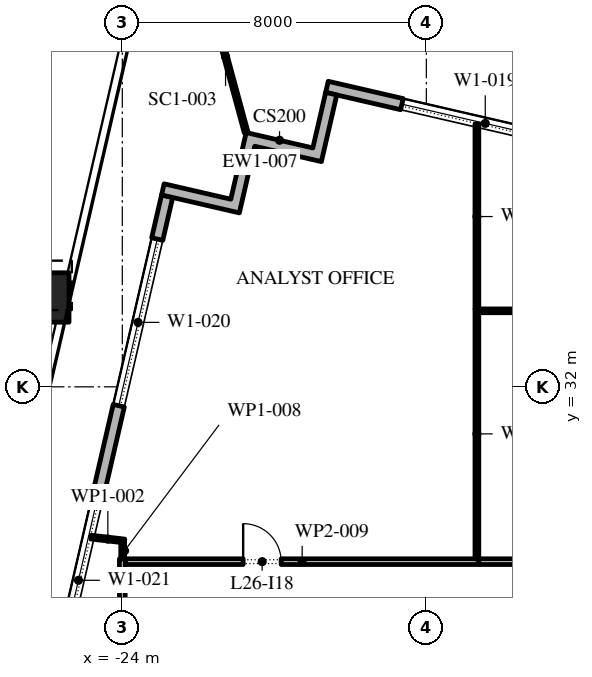
"""IFC4 building model, lengths in metres.
Left out: names, types, materials, properties, quantities, classifications, styles, units other than length and angle.
Written with IfcOpenShell. Run it as: python <this file> out.ifc"""

import sys

from ifc_helpers import new_model, si_unit, direction, frame, frame_2d, origin, origin_2d, place, context, subcontext, project, spatial, polyline, rectangle, outline, extrude, element, fill, save


model = new_model("IFC4")
c1 = context("Model", 3, precision=1e-05, world=origin(), true_north=direction((0.0, 1.0)))
c2 = subcontext(c1, "Body", "Model", "MODEL_VIEW")
j1 = project(units=[si_unit("LENGTHUNIT", "METRE"), si_unit("PLANEANGLEUNIT", "RADIAN")], contexts=[c1])
p1 = place(None, origin())
s1 = spatial("IfcSite", under=j1, at=p1, CompositionType="ELEMENT")
p2 = place(p1, origin())
s2 = spatial("IfcBuilding", under=s1, at=p2, CompositionType="ELEMENT")
p3 = place(p2, frame((0.0, 0.0, 122.4)))
s3 = spatial("IfcBuildingStorey", under=s2, at=p3, CompositionType="ELEMENT", Elevation=122.4)
p4 = place(p3, frame((-26.052, 34.351, 0.0), z_axis=(0.017443081717, 0.075683271502, 0.996979328429), x_axis=(-0.974454034257, 0.224587032398, 0.0)))
e1 = element("IfcColumn", 1, at=p4, inside=s3, PredefinedType="COLUMN", context=c2, shape_type="SweptSolid", body=[
    extrude(rectangle(XDim=1.3, YDim=1.3, at=origin_2d()), origin(), (0.0, 0.0, 1.0), 4.213),
])
p5 = place(p3, frame((31.078, 28.421, 0.0), z_axis=(0.0, 0.0, 1.0), x_axis=(-0.974370456532, 0.224949357493, 0.0)))
e2 = element("IfcWall", 2, at=p5, inside=s3, PredefinedType="STANDARD", context=c2, shape_type="SweptSolid", body=[
    extrude(rectangle(XDim=51.0, YDim=0.3, at=frame_2d((25.5, 0.0))), origin(), (0.0, 0.0, 1.0), 4.0),
])
p6 = place(p5, frame((1.875, 0.0, 0.45)))
e3 = element("IfcOpeningElement", 3, at=p6, cuts=e2, PredefinedType="OPENING", context=c2, shape_type="SweptSolid", body=[
    extrude(rectangle(XDim=4.5, YDim=2.95, at=frame_2d((2.25, 1.475))), frame((0.0, 0.16, 0.0), z_axis=(0.0, -1.0, 0.0), x_axis=(1.0, 0.0, 0.0)), (0.0, 0.0, 1.0), 0.32),
])
p7 = place(p5, frame((10.275, 0.0, 0.45)))
e4 = element("IfcOpeningElement", 4, at=p7, cuts=e2, PredefinedType="OPENING", context=c2, shape_type="SweptSolid", body=[
    extrude(rectangle(XDim=4.5, YDim=2.875, at=frame_2d((2.25, 1.438))), frame((0.0, 0.16, 0.0), z_axis=(0.0, -1.0, 0.0), x_axis=(1.0, 0.0, 0.0)), (0.0, 0.0, 1.0), 0.32),
])
p8 = place(p5, frame((18.825, 0.0, 0.45)))
e5 = element("IfcOpeningElement", 5, at=p8, cuts=e2, PredefinedType="OPENING", context=c2, shape_type="SweptSolid", body=[
    extrude(rectangle(XDim=4.5, YDim=2.825, at=frame_2d((2.25, 1.413))), frame((0.0, 0.16, 0.0), z_axis=(0.0, -1.0, 0.0), x_axis=(1.0, 0.0, 0.0)), (0.0, 0.0, 1.0), 0.32),
])
p9 = place(p5, frame((27.075, 0.0, 0.0)))
e6 = element("IfcOpeningElement", 6, at=p9, cuts=e2, PredefinedType="OPENING", context=c2, shape_type="SweptSolid", body=[
    extrude(rectangle(XDim=2.4, YDim=3.125, at=frame_2d((1.2, 1.562))), frame((0.0, 0.16, 0.0), z_axis=(0.0, -1.0, 0.0), x_axis=(1.0, 0.0, 0.0)), (0.0, 0.0, 1.0), 0.32),
])
p10 = place(p5, frame((35.925, 0.0, 0.45)))
e7 = element("IfcOpeningElement", 7, at=p10, cuts=e2, PredefinedType="OPENING", context=c2, shape_type="SweptSolid", body=[
    extrude(rectangle(XDim=4.5, YDim=2.575, at=frame_2d((2.25, 1.288))), frame((0.0, 0.16, 0.0), z_axis=(0.0, -1.0, 0.0), x_axis=(1.0, 0.0, 0.0)), (0.0, 0.0, 1.0), 0.32),
])
p11 = place(p5, frame((44.475, 0.0, 0.45)))
e8 = element("IfcOpeningElement", 8, at=p11, cuts=e2, PredefinedType="OPENING", context=c2, shape_type="SweptSolid", body=[
    extrude(rectangle(XDim=4.5, YDim=3.05, at=frame_2d((2.25, 1.525))), frame((0.0, 0.16, 0.0), z_axis=(0.0, -1.0, 0.0), x_axis=(1.0, 0.0, 0.0)), (0.0, 0.0, 1.0), 0.32),
])
p12 = place(p3, frame((-22.82, 37.016, 0.0), z_axis=(0.0, 0.0, 1.0), x_axis=(-0.224953880882, -0.974369412223, 0.0)))
e9 = element("IfcWall", 9, at=p12, inside=s3, PredefinedType="STANDARD", context=c2, shape_type="SweptSolid", body=[
    extrude(rectangle(XDim=49.5, YDim=0.3, at=frame_2d((24.75, 0.0))), origin(), (0.0, 0.0, 1.0), 4.0),
])
p13 = place(p12, frame((1.157, 0.0, 0.45)))
e10 = element("IfcOpeningElement", 10, at=p13, cuts=e9, PredefinedType="OPENING", context=c2, shape_type="SweptSolid", body=[
    extrude(rectangle(XDim=4.5, YDim=3.05, at=frame_2d((2.25, 1.525))), frame((0.0, 0.16, 0.0), z_axis=(0.0, -1.0, 0.0), x_axis=(1.0, 0.0, 0.0)), (0.0, 0.0, 1.0), 0.32),
])
p14 = place(p12, frame((8.121, 0.0, 0.45)))
e11 = element("IfcOpeningElement", 11, at=p14, cuts=e9, PredefinedType="OPENING", context=c2, shape_type="SweptSolid", body=[
    extrude(rectangle(XDim=4.5, YDim=3.05, at=frame_2d((2.25, 1.525))), frame((0.0, 0.16, 0.0), z_axis=(0.0, -1.0, 0.0), x_axis=(1.0, 0.0, 0.0)), (0.0, 0.0, 1.0), 0.32),
])
p15 = place(p12, frame((15.236, 0.0, 0.45)))
e12 = element("IfcOpeningElement", 12, at=p15, cuts=e9, PredefinedType="OPENING", context=c2, shape_type="SweptSolid", body=[
    extrude(rectangle(XDim=4.5, YDim=3.05, at=frame_2d((2.25, 1.525))), frame((0.0, 0.16, 0.0), z_axis=(0.0, -1.0, 0.0), x_axis=(1.0, 0.0, 0.0)), (0.0, 0.0, 1.0), 0.32),
])
p16 = place(p12, frame((23.4, 0.0, 0.0)))
e13 = element("IfcOpeningElement", 13, at=p16, cuts=e9, PredefinedType="OPENING", context=c2, shape_type="SweptSolid", body=[
    extrude(rectangle(XDim=2.4, YDim=3.5, at=frame_2d((1.2, 1.75))), frame((0.0, 0.16, 0.0), z_axis=(0.0, -1.0, 0.0), x_axis=(1.0, 0.0, 0.0)), (0.0, 0.0, 1.0), 0.32),
])
p17 = place(p12, frame((29.464, 0.0, 0.45)))
e14 = element("IfcOpeningElement", 14, at=p17, cuts=e9, PredefinedType="OPENING", context=c2, shape_type="SweptSolid", body=[
    extrude(rectangle(XDim=4.5, YDim=2.875, at=frame_2d((2.25, 1.438))), frame((0.0, 0.16, 0.0), z_axis=(0.0, -1.0, 0.0), x_axis=(1.0, 0.0, 0.0)), (0.0, 0.0, 1.0), 0.32),
])
p18 = place(p12, frame((36.579, 0.0, 0.45)))
e15 = element("IfcOpeningElement", 15, at=p18, cuts=e9, PredefinedType="OPENING", context=c2, shape_type="SweptSolid", body=[
    extrude(rectangle(XDim=4.5, YDim=2.675, at=frame_2d((2.25, 1.337))), frame((0.0, 0.16, 0.0), z_axis=(0.0, -1.0, 0.0), x_axis=(1.0, 0.0, 0.0)), (0.0, 0.0, 1.0), 0.32),
])
p19 = place(p12, frame((43.693, 0.0, 0.45)))
e16 = element("IfcOpeningElement", 16, at=p19, cuts=e9, PredefinedType="OPENING", context=c2, shape_type="SweptSolid", body=[
    extrude(rectangle(XDim=4.5, YDim=3.05, at=frame_2d((2.25, 1.525))), frame((0.0, 0.16, 0.0), z_axis=(0.0, -1.0, 0.0), x_axis=(1.0, 0.0, 0.0)), (0.0, 0.0, 1.0), 0.32),
])
p20 = place(p3, origin())
e17 = element("IfcWall", 17, at=p20, inside=s3, PredefinedType="STANDARD", context=c2, shape_type="SweptSolid", body=[
    extrude(outline(polyline([(-22.967, 37.049), (-22.899, 37.342), (-21.145, 36.937), (-20.74, 38.691), (-18.986, 38.286), (-18.649, 39.747), (-18.357, 39.68), (-18.762, 37.926), (-20.515, 38.331), (-20.92, 36.577), (-22.967, 37.049)])), origin(), (0.0, 0.0, 1.0), 4.0),
])
p21 = place(p3, frame((-20.74, 38.691, -0.05), z_axis=(0.0, 0.0, 1.0), x_axis=(-0.26250811514, 0.964929784744, 0.0)))
e18 = element("IfcWall", 18, at=p21, inside=s3, PredefinedType="STANDARD", context=c2, shape_type="SweptSolid", body=[
    extrude(rectangle(XDim=4.137, YDim=0.1, at=frame_2d((2.068, 0.0))), origin(), (0.0, 0.0, 1.0), 4.05),
])
p22 = place(p3, frame((-24.82, 28.045, 0.0), z_axis=(0.0, 0.0, 1.0), x_axis=(0.993501545499, -0.113818623659, 0.0)))
e19 = element("IfcWall", 19, at=p22, inside=s3, PredefinedType="PARTITIONING", context=c2, shape_type="SweptSolid", body=[
    extrude(rectangle(XDim=0.886, YDim=0.1, at=frame_2d((0.443, 0.0))), origin(), (0.0, 0.0, 1.0), 4.0),
])
p23 = place(p3, frame((-24.0, 3.45, 0.0), z_axis=(0.0, 0.0, 1.0), x_axis=(0.0, 1.0, 0.0)))
e20 = element("IfcWall", 20, at=p23, inside=s3, PredefinedType="PARTITIONING", context=c2, shape_type="SweptSolid", body=[
    extrude(rectangle(XDim=24.025, YDim=0.15, at=frame_2d((12.013, 0.0))), origin(), (0.0, 0.0, 1.0), 4.0),
])
p24 = place(p23, frame((16.3, 0.0, 0.0)))
e21 = element("IfcOpeningElement", 21, at=p24, cuts=e20, PredefinedType="OPENING", context=c2, shape_type="SweptSolid", body=[
    extrude(rectangle(XDim=1.0, YDim=2.1, at=frame_2d((0.5, 1.05))), frame((0.0, 0.085, 0.0), z_axis=(0.0, -1.0, 0.0), x_axis=(1.0, 0.0, 0.0)), (0.0, 0.0, 1.0), 0.17),
])
p25 = place(p3, frame((-23.99, 27.475, 0.0), z_axis=(0.0, 0.0, 1.0), x_axis=(0.0, 1.0, 0.0)))
e22 = element("IfcWall", 22, at=p25, inside=s3, PredefinedType="PARTITIONING", context=c2, shape_type="SweptSolid", body=[
    extrude(rectangle(XDim=0.425, YDim=0.1, at=frame_2d((0.212, 0.0))), origin(), (0.0, 0.0, 1.0), 4.0),
])
p26 = place(p3, frame((-23.915, 27.4, 0.0), z_axis=(0.0, 0.0, 1.0), x_axis=(1.0, 0.0, 0.0)))
e23 = element("IfcWall", 23, at=p26, inside=s3, PredefinedType="PARTITIONING", context=c2, shape_type="SweptSolid", body=[
    extrude(rectangle(XDim=9.295, YDim=0.15, at=frame_2d((4.647, 0.0))), origin(), (0.0, 0.0, 1.0), 4.0),
])
p27 = place(p26, frame((3.095, 0.0, 0.0)))
e24 = element("IfcOpeningElement", 24, at=p27, cuts=e23, PredefinedType="OPENING", context=c2, shape_type="SweptSolid", body=[
    extrude(rectangle(XDim=1.0, YDim=2.1, at=frame_2d((0.5, 1.05))), frame((0.0, 0.085, 0.0), z_axis=(0.0, -1.0, 0.0), x_axis=(1.0, 0.0, 0.0)), (0.0, 0.0, 1.0), 0.17),
])
p28 = place(p3, frame((-14.67, 27.475, 0.0), z_axis=(0.0, 0.0, 1.0), x_axis=(0.0, 1.0, 0.0)))
e25 = element("IfcWall", 25, at=p28, inside=s3, PredefinedType="PARTITIONING", context=c2, shape_type="SweptSolid", body=[
    extrude(rectangle(XDim=6.575, YDim=0.1, at=frame_2d((3.288, 0.0))), origin(), (0.0, 0.0, 1.0), 4.0),
])
p29 = place(p3, frame((-14.62, 27.4, 0.0), z_axis=(0.0, 0.0, 1.0), x_axis=(1.0, 0.0, 0.0)))
e26 = element("IfcWall", 26, at=p29, inside=s3, PredefinedType="PARTITIONING", context=c2, shape_type="SweptSolid", body=[
    extrude(rectangle(XDim=6.695, YDim=0.15, at=frame_2d((3.348, 0.0))), origin(), (0.0, 0.0, 1.0), 4.0),
])
p30 = place(p3, frame((-14.67, 34.05, 0.0), z_axis=(0.0, 0.0, 1.0), x_axis=(0.0, 1.0, 0.0)))
e27 = element("IfcWall", 27, at=p30, inside=s3, PredefinedType="PARTITIONING", context=c2, shape_type="SweptSolid", body=[
    extrude(rectangle(XDim=4.861, YDim=0.1, at=frame_2d((2.43, 0.0))), origin(), (0.0, 0.0, 1.0), 4.0),
])
p31 = place(p3, frame((-3.95, 34.0, 0.0), z_axis=(0.0, 0.0, 1.0), x_axis=(-1.0, 0.0, 0.0)))
e28 = element("IfcWall", 28, at=p31, inside=s3, PredefinedType="PARTITIONING", context=c2, shape_type="SweptSolid", body=[
    extrude(rectangle(XDim=10.67, YDim=0.1, at=frame_2d((5.335, 0.0))), origin(), (0.0, 0.0, 1.0), 4.0),
])
p32 = place(p31, frame((7.0, 0.0, 0.0)))
e29 = element("IfcOpeningElement", 29, at=p32, cuts=e28, PredefinedType="OPENING", context=c2, shape_type="SweptSolid", body=[
    extrude(rectangle(XDim=0.9, YDim=2.1, at=frame_2d((0.45, 1.05))), frame((0.0, 0.06, 0.0), z_axis=(0.0, -1.0, 0.0), x_axis=(1.0, 0.0, 0.0)), (0.0, 0.0, 1.0), 0.12),
])
p33 = place(p11, origin())
e30 = element("IfcWindow", 30, at=p33, inside=s3, PartitioningType="DOUBLE_PANEL_VERTICAL", PredefinedType="WINDOW", context=c2, shape_type="SweptSolid", body=[
    extrude(rectangle(XDim=4.5, YDim=3.05, at=frame_2d((2.25, 1.525))), frame((0.0, 0.03, 0.0), z_axis=(0.0, -1.0, 0.0), x_axis=(1.0, 0.0, 0.0)), (0.0, 0.0, 1.0), 0.06),
])
fill(e8, e30)
p34 = place(p13, origin())
e31 = element("IfcWindow", 31, at=p34, inside=s3, PartitioningType="DOUBLE_PANEL_VERTICAL", PredefinedType="WINDOW", context=c2, shape_type="SweptSolid", body=[
    extrude(rectangle(XDim=4.5, YDim=3.05, at=frame_2d((2.25, 1.525))), frame((0.0, 0.03, 0.0), z_axis=(0.0, -1.0, 0.0), x_axis=(1.0, 0.0, 0.0)), (0.0, 0.0, 1.0), 0.06),
])
fill(e10, e31)
p35 = place(p14, origin())
e32 = element("IfcWindow", 32, at=p35, inside=s3, PartitioningType="DOUBLE_PANEL_VERTICAL", PredefinedType="WINDOW", context=c2, shape_type="SweptSolid", body=[
    extrude(rectangle(XDim=4.5, YDim=3.05, at=frame_2d((2.25, 1.525))), frame((0.0, 0.03, 0.0), z_axis=(0.0, -1.0, 0.0), x_axis=(1.0, 0.0, 0.0)), (0.0, 0.0, 1.0), 0.06),
])
fill(e11, e32)
p36 = place(p27, origin())
e33 = element("IfcDoor", 33, at=p36, inside=s3, OperationType="SINGLE_SWING_RIGHT", PredefinedType="DOOR", context=c2, shape_type="SweptSolid", body=[
    extrude(rectangle(XDim=1.0, YDim=2.1, at=frame_2d((0.5, 1.05))), frame((0.0, 0.025, 0.0), z_axis=(0.0, -1.0, 0.0), x_axis=(1.0, 0.0, 0.0)), (0.0, 0.0, 1.0), 0.05),
])
fill(e24, e33)
save(model, sys.argv[1])
